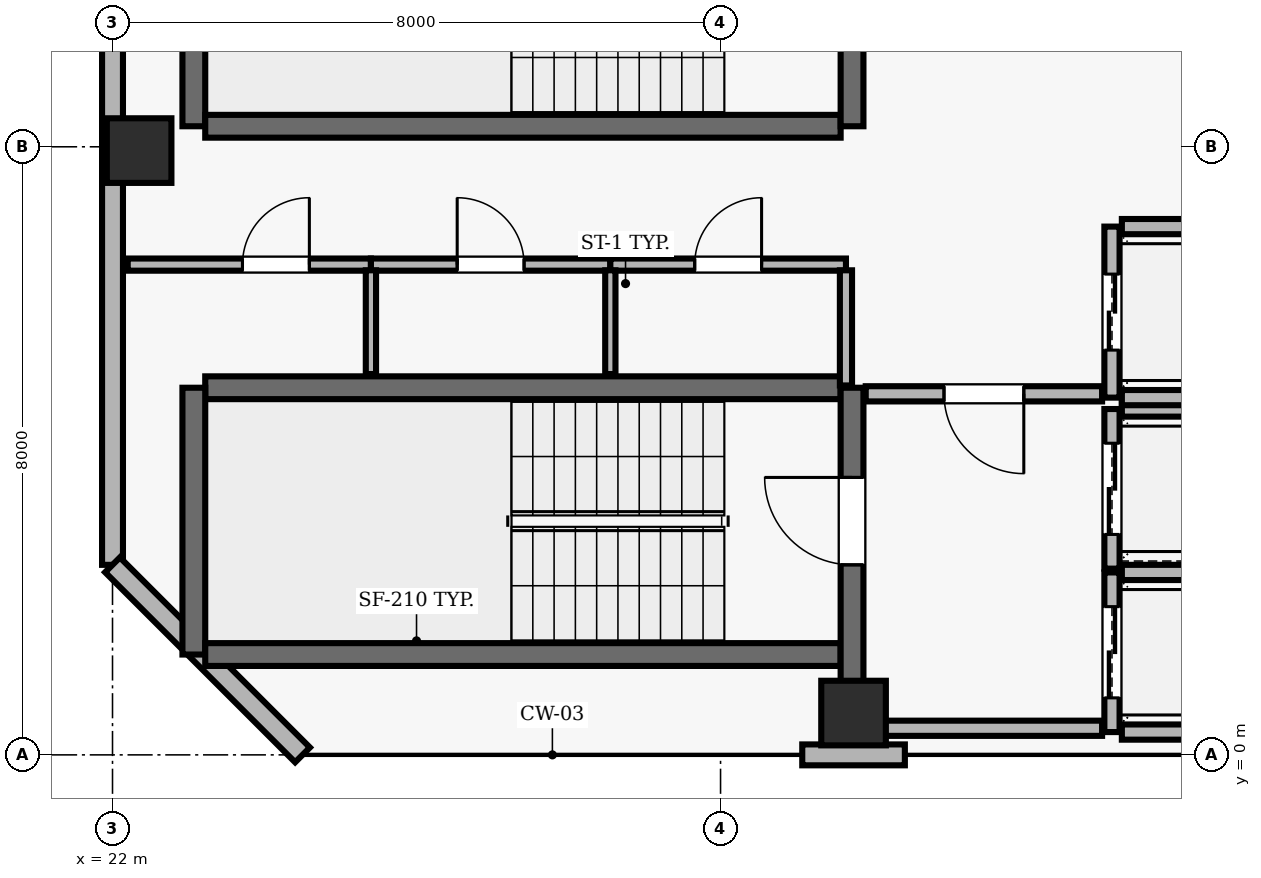
"""IFC4 building model, lengths in metres.
Left out: names, types, materials, properties, quantities, classifications, styles, units other than length and angle.
Written with IfcOpenShell. Run it as: python <this file> out.ifc"""

import sys

from ifc_helpers import new_model, si_unit, direction, frame, frame_2d, origin, origin_2d, place, context, subcontext, project, spatial, rectangle, extrude, element, fill, save


model = new_model("IFC4")
c1 = context("Model", 3, precision=1e-05, world=origin(), true_north=direction((0.0, 1.0)))
c2 = subcontext(c1, "Body", "Model", "MODEL_VIEW")
j1 = project(units=[si_unit("LENGTHUNIT", "METRE"), si_unit("PLANEANGLEUNIT", "RADIAN")], contexts=[c1])
p1 = place(None, origin())
s1 = spatial("IfcSite", under=j1, at=p1, CompositionType="ELEMENT")
p2 = place(p1, origin())
s2 = spatial("IfcBuilding", under=s1, at=p2, CompositionType="ELEMENT")
p3 = place(p2, frame((0.0, 0.0, 256.0)))
s3 = spatial("IfcBuildingStorey", under=s2, at=p3, CompositionType="ELEMENT", Elevation=256.0)
for number, where, z_axis, x_axis in (
    (1, (31.75, 0.55, 0.0), (0.0, 0.0, 1.0), (1.0, 0.0, 0.0)),
    (2, (22.35, 7.95, 0.0), (0.0, 0.0, 1.0), (1.0, 0.0, 0.0)),
):
    element("IfcColumn", number, at=place(p3, frame(where, z_axis=z_axis, x_axis=x_axis)), inside=s3, PredefinedType="COLUMN", context=c2, shape_type="SweptSolid", body=[
        extrude(rectangle(XDim=0.85, YDim=0.85, at=origin_2d()), origin(), (0.0, 0.0, 1.0), 3.9),
    ])
p4 = place(p3, frame((31.075, 0.0, 0.0), z_axis=(0.0, 0.0, 1.0), x_axis=(1.0, 0.0, 0.0)))
e3 = element("IfcWall", 3, at=p4, inside=s3, PredefinedType="SOLIDWALL", context=c2, shape_type="SweptSolid", body=[
    extrude(rectangle(XDim=1.35, YDim=0.275, at=frame_2d((0.675, 0.0))), origin(), (0.0, 0.0, 1.0), 3.69),
])
p5 = place(p3, frame((22.0, 35.3, 0.0), z_axis=(0.0, 0.0, 1.0), x_axis=(0.0, -1.0, 0.0)))
e4 = element("IfcWall", 4, at=p5, inside=s3, PredefinedType="SOLIDWALL", context=c2, shape_type="SweptSolid", body=[
    extrude(rectangle(XDim=32.8, YDim=0.275, at=frame_2d((16.4, 0.0))), origin(), (0.0, 0.0, 1.0), 3.69),
])
p6 = place(p5, frame((7.3, 0.0, 0.0)))
e5 = element("IfcOpeningElement", 5, at=p6, cuts=e4, PredefinedType="OPENING", context=c2, shape_type="SweptSolid", body=[
    extrude(rectangle(XDim=1.0, YDim=2.2, at=frame_2d((0.5, 1.1))), frame((0.0, 0.147, 0.0), z_axis=(0.0, -1.0, 0.0), x_axis=(1.0, 0.0, 0.0)), (0.0, 0.0, 1.0), 0.295),
])
p7 = place(p5, frame((1.833, 0.0, 0.9)))
e6 = element("IfcOpeningElement", 6, at=p7, cuts=e4, PredefinedType="OPENING", context=c2, shape_type="SweptSolid", body=[
    extrude(rectangle(XDim=1.8, YDim=1.6, at=frame_2d((0.9, 0.8))), frame((0.0, 0.147, 0.0), z_axis=(0.0, -1.0, 0.0), x_axis=(1.0, 0.0, 0.0)), (0.0, 0.0, 1.0), 0.295),
])
p8 = place(p5, frame((12.767, 0.0, 0.9)))
e7 = element("IfcOpeningElement", 7, at=p8, cuts=e4, PredefinedType="OPENING", context=c2, shape_type="SweptSolid", body=[
    extrude(rectangle(XDim=1.8, YDim=1.6, at=frame_2d((0.9, 0.8))), frame((0.0, 0.147, 0.0), z_axis=(0.0, -1.0, 0.0), x_axis=(1.0, 0.0, 0.0)), (0.0, 0.0, 1.0), 0.295),
])
p9 = place(p5, frame((18.233, 0.0, 0.9)))
e8 = element("IfcOpeningElement", 8, at=p9, cuts=e4, PredefinedType="OPENING", context=c2, shape_type="SweptSolid", body=[
    extrude(rectangle(XDim=1.8, YDim=1.6, at=frame_2d((0.9, 0.8))), frame((0.0, 0.147, 0.0), z_axis=(0.0, -1.0, 0.0), x_axis=(1.0, 0.0, 0.0)), (0.0, 0.0, 1.0), 0.295),
])
p10 = place(p5, frame((23.7, 0.0, 0.9)))
e9 = element("IfcOpeningElement", 9, at=p10, cuts=e4, PredefinedType="OPENING", context=c2, shape_type="SweptSolid", body=[
    extrude(rectangle(XDim=1.8, YDim=1.6, at=frame_2d((0.9, 0.8))), frame((0.0, 0.147, 0.0), z_axis=(0.0, -1.0, 0.0), x_axis=(1.0, 0.0, 0.0)), (0.0, 0.0, 1.0), 0.295),
])
p11 = place(p3, frame((22.0, 2.5, 0.0), z_axis=(0.0, 0.0, 1.0), x_axis=(0.707106781187, -0.707106781187, 0.0)))
e10 = element("IfcWall", 10, at=p11, inside=s3, PredefinedType="SOLIDWALL", context=c2, shape_type="SweptSolid", body=[
    extrude(rectangle(XDim=3.536, YDim=0.275, at=frame_2d((1.768, 0.0))), origin(), (0.0, 0.0, 1.0), 3.69),
])
p12 = place(p3, frame((31.58, 4.83, 0.0), z_axis=(0.0, 0.0, 1.0), x_axis=(-1.0, 0.0, 0.0)))
e11 = element("IfcWall", 11, at=p12, inside=s3, PredefinedType="SHEAR", context=c2, shape_type="SweptSolid", body=[
    extrude(rectangle(XDim=8.36, YDim=0.3, at=frame_2d((4.18, 0.0))), origin(), (0.0, 0.0, 1.0), 3.69),
])
p13 = place(p3, frame((23.07, 4.83, 0.0), z_axis=(0.0, 0.0, 1.0), x_axis=(0.0, -1.0, 0.0)))
e12 = element("IfcWall", 12, at=p13, inside=s3, PredefinedType="SHEAR", context=c2, shape_type="SweptSolid", body=[
    extrude(rectangle(XDim=3.51, YDim=0.3, at=frame_2d((1.755, 0.0))), origin(), (0.0, 0.0, 1.0), 3.69),
])
p14 = place(p3, frame((23.22, 1.32, 0.0), z_axis=(0.0, 0.0, 1.0), x_axis=(1.0, 0.0, 0.0)))
e13 = element("IfcWall", 13, at=p14, inside=s3, PredefinedType="SHEAR", context=c2, shape_type="SweptSolid", body=[
    extrude(rectangle(XDim=8.36, YDim=0.3, at=frame_2d((4.18, 0.0))), origin(), (0.0, 0.0, 1.0), 3.69),
])
p15 = place(p3, frame((31.73, 0.96, 0.0), z_axis=(0.0, 0.0, 1.0), x_axis=(0.0, 1.0, 0.0)))
e14 = element("IfcWall", 14, at=p15, inside=s3, PredefinedType="SHEAR", context=c2, shape_type="SweptSolid", body=[
    extrude(rectangle(XDim=3.87, YDim=0.3, at=frame_2d((1.935, 0.0))), origin(), (0.0, 0.0, 1.0), 3.69),
])
p16 = place(p15, frame((1.54, 0.0, 0.0)))
e15 = element("IfcOpeningElement", 15, at=p16, cuts=e14, PredefinedType="OPENING", context=c2, shape_type="SweptSolid", body=[
    extrude(rectangle(XDim=1.15, YDim=2.15, at=frame_2d((0.575, 1.075))), frame((0.0, 0.16, 0.0), z_axis=(0.0, -1.0, 0.0), x_axis=(1.0, 0.0, 0.0)), (0.0, 0.0, 1.0), 0.32),
])
p17 = place(p3, frame((23.07, 11.78, 0.0), z_axis=(0.0, 0.0, 1.0), x_axis=(0.0, -1.0, 0.0)))
e16 = element("IfcWall", 16, at=p17, inside=s3, PredefinedType="SHEAR", context=c2, shape_type="SweptSolid", body=[
    extrude(rectangle(XDim=3.51, YDim=0.3, at=frame_2d((1.755, 0.0))), origin(), (0.0, 0.0, 1.0), 3.69),
])
p18 = place(p3, frame((23.22, 8.27, 0.0), z_axis=(0.0, 0.0, 1.0), x_axis=(1.0, 0.0, 0.0)))
e17 = element("IfcWall", 17, at=p18, inside=s3, PredefinedType="SHEAR", context=c2, shape_type="SweptSolid", body=[
    extrude(rectangle(XDim=8.36, YDim=0.3, at=frame_2d((4.18, 0.0))), origin(), (0.0, 0.0, 1.0), 3.69),
])
p19 = place(p3, frame((31.73, 8.27, 0.0), z_axis=(0.0, 0.0, 1.0), x_axis=(0.0, 1.0, 0.0)))
e18 = element("IfcWall", 18, at=p19, inside=s3, PredefinedType="SHEAR", context=c2, shape_type="SweptSolid", body=[
    extrude(rectangle(XDim=3.51, YDim=0.3, at=frame_2d((1.755, 0.0))), origin(), (0.0, 0.0, 1.0), 3.69),
])
p20 = place(p19, frame((1.18, 0.0, 0.0)))
e19 = element("IfcOpeningElement", 19, at=p20, cuts=e18, PredefinedType="OPENING", context=c2, shape_type="SweptSolid", body=[
    extrude(rectangle(XDim=1.15, YDim=2.15, at=frame_2d((0.575, 1.075))), frame((0.0, 0.16, 0.0), z_axis=(0.0, -1.0, 0.0), x_axis=(1.0, 0.0, 0.0)), (0.0, 0.0, 1.0), 0.32),
])
p21 = place(p3, frame((35.15, 2.4, 0.0), z_axis=(0.0, 0.0, 1.0), x_axis=(0.0, -1.0, 0.0)))
e20 = element("IfcWall", 20, at=p21, inside=s3, PredefinedType="SOLIDWALL", context=c2, shape_type="SweptSolid", body=[
    extrude(rectangle(XDim=2.1, YDim=0.2, at=frame_2d((1.05, 0.0))), origin(), (0.0, 0.0, 1.0), 3.69),
])
p22 = place(p21, frame((0.45, 0.0, 0.0)))
e21 = element("IfcOpeningElement", 21, at=p22, cuts=e20, PredefinedType="OPENING", context=c2, shape_type="SweptSolid", body=[
    extrude(rectangle(XDim=1.2, YDim=2.15, at=frame_2d((0.6, 1.075))), frame((0.0, 0.11, 0.0), z_axis=(0.0, -1.0, 0.0), x_axis=(1.0, 0.0, 0.0)), (0.0, 0.0, 1.0), 0.22),
])
for number, where, z_axis, x_axis in (
    (22, (35.28, 0.3, 0.0), (0.0, 0.0, 1.0), (1.0, 0.0, 0.0)),
    (23, (37.42, 2.4, 0.0), (0.0, 0.0, 1.0), (-1.0, 0.0, 0.0)),
):
    element("IfcWall", number, at=place(p3, frame(where, z_axis=z_axis, x_axis=x_axis)), inside=s3, PredefinedType="SOLIDWALL", context=c2, shape_type="SweptSolid", body=[
        extrude(rectangle(XDim=2.14, YDim=0.2, at=frame_2d((1.07, 0.0))), origin(), (0.0, 0.0, 1.0), 3.69),
    ])
p23 = place(p3, frame((35.15, 4.55, 0.0), z_axis=(0.0, 0.0, 1.0), x_axis=(0.0, -1.0, 0.0)))
e24 = element("IfcWall", 24, at=p23, inside=s3, PredefinedType="SOLIDWALL", context=c2, shape_type="SweptSolid", body=[
    extrude(rectangle(XDim=2.1, YDim=0.2, at=frame_2d((1.05, 0.0))), origin(), (0.0, 0.0, 1.0), 3.69),
])
p24 = place(p23, frame((0.45, 0.0, 0.0)))
e25 = element("IfcOpeningElement", 25, at=p24, cuts=e24, PredefinedType="OPENING", context=c2, shape_type="SweptSolid", body=[
    extrude(rectangle(XDim=1.2, YDim=2.15, at=frame_2d((0.6, 1.075))), frame((0.0, 0.11, 0.0), z_axis=(0.0, -1.0, 0.0), x_axis=(1.0, 0.0, 0.0)), (0.0, 0.0, 1.0), 0.22),
])
p25 = place(p3, frame((37.42, 4.55, 0.0), z_axis=(0.0, 0.0, 1.0), x_axis=(-1.0, 0.0, 0.0)))
e26 = element("IfcWall", 26, at=p25, inside=s3, PredefinedType="SOLIDWALL", context=c2, shape_type="SweptSolid", body=[
    extrude(rectangle(XDim=2.14, YDim=0.2, at=frame_2d((1.07, 0.0))), origin(), (0.0, 0.0, 1.0), 3.69),
])
p26 = place(p3, frame((35.15, 6.95, 0.0), z_axis=(0.0, 0.0, 1.0), x_axis=(0.0, -1.0, 0.0)))
e27 = element("IfcWall", 27, at=p26, inside=s3, PredefinedType="SOLIDWALL", context=c2, shape_type="SweptSolid", body=[
    extrude(rectangle(XDim=2.25, YDim=0.2, at=frame_2d((1.125, 0.0))), origin(), (0.0, 0.0, 1.0), 3.69),
])
p27 = place(p26, frame((0.625, 0.0, 0.0)))
e28 = element("IfcOpeningElement", 28, at=p27, cuts=e27, PredefinedType="OPENING", context=c2, shape_type="SweptSolid", body=[
    extrude(rectangle(XDim=1.0, YDim=2.1, at=frame_2d((0.5, 1.05))), frame((0.0, 0.11, 0.0), z_axis=(0.0, -1.0, 0.0), x_axis=(1.0, 0.0, 0.0)), (0.0, 0.0, 1.0), 0.22),
])
for number, where, z_axis, x_axis in (
    (29, (35.28, 4.7, 0.0), (0.0, 0.0, 1.0), (1.0, 0.0, 0.0)),
    (30, (37.42, 6.95, 0.0), (0.0, 0.0, 1.0), (-1.0, 0.0, 0.0)),
):
    element("IfcWall", number, at=place(p3, frame(where, z_axis=z_axis, x_axis=x_axis)), inside=s3, PredefinedType="SOLIDWALL", context=c2, shape_type="SweptSolid", body=[
        extrude(rectangle(XDim=2.14, YDim=0.2, at=frame_2d((1.07, 0.0))), origin(), (0.0, 0.0, 1.0), 3.69),
    ])
p28 = place(p3, frame((22.2, 6.45, 0.0), z_axis=(0.0, 0.0, 1.0), x_axis=(1.0, 0.0, 0.0)))
e31 = element("IfcWall", 31, at=p28, inside=s3, PredefinedType="PARTITIONING", context=c2, shape_type="SweptSolid", body=[
    extrude(rectangle(XDim=3.2, YDim=0.16, at=frame_2d((1.6, 0.0))), origin(), (0.0, 0.0, 1.0), 3.69),
])
p29 = place(p28, frame((1.51, 0.0, 0.0)))
e32 = element("IfcOpeningElement", 32, at=p29, cuts=e31, PredefinedType="OPENING", context=c2, shape_type="SweptSolid", body=[
    extrude(rectangle(XDim=0.88, YDim=2.1, at=frame_2d((0.44, 1.05))), frame((0.0, 0.09, 0.0), z_axis=(0.0, -1.0, 0.0), x_axis=(1.0, 0.0, 0.0)), (0.0, 0.0, 1.0), 0.18),
])
p30 = place(p3, frame((25.4, 6.45, 0.0), z_axis=(0.0, 0.0, 1.0), x_axis=(1.0, 0.0, 0.0)))
e33 = element("IfcWall", 33, at=p30, inside=s3, PredefinedType="PARTITIONING", context=c2, shape_type="SweptSolid", body=[
    extrude(rectangle(XDim=3.15, YDim=0.16, at=frame_2d((1.575, 0.0))), origin(), (0.0, 0.0, 1.0), 3.69),
])
p31 = place(p30, frame((1.135, 0.0, 0.0)))
e34 = element("IfcOpeningElement", 34, at=p31, cuts=e33, PredefinedType="OPENING", context=c2, shape_type="SweptSolid", body=[
    extrude(rectangle(XDim=0.88, YDim=2.1, at=frame_2d((0.44, 1.05))), frame((0.0, 0.09, 0.0), z_axis=(0.0, -1.0, 0.0), x_axis=(1.0, 0.0, 0.0)), (0.0, 0.0, 1.0), 0.18),
])
p32 = place(p3, frame((28.55, 6.45, 0.0), z_axis=(0.0, 0.0, 1.0), x_axis=(1.0, 0.0, 0.0)))
e35 = element("IfcWall", 35, at=p32, inside=s3, PredefinedType="PARTITIONING", context=c2, shape_type="SweptSolid", body=[
    extrude(rectangle(XDim=3.1, YDim=0.16, at=frame_2d((1.55, 0.0))), origin(), (0.0, 0.0, 1.0), 3.69),
])
p33 = place(p32, frame((1.11, 0.0, 0.0)))
e36 = element("IfcOpeningElement", 36, at=p33, cuts=e35, PredefinedType="OPENING", context=c2, shape_type="SweptSolid", body=[
    extrude(rectangle(XDim=0.88, YDim=2.1, at=frame_2d((0.44, 1.05))), frame((0.0, 0.09, 0.0), z_axis=(0.0, -1.0, 0.0), x_axis=(1.0, 0.0, 0.0)), (0.0, 0.0, 1.0), 0.18),
])
p34 = place(p3, frame((31.65, 0.35, 0.0), z_axis=(0.0, 0.0, 1.0), x_axis=(1.0, 0.0, 0.0)))
e37 = element("IfcWall", 37, at=p34, inside=s3, PredefinedType="SOLIDWALL", context=c2, shape_type="SweptSolid", body=[
    extrude(rectangle(XDim=3.37, YDim=0.2, at=frame_2d((1.685, 0.0))), origin(), (0.0, 0.0, 1.0), 3.69),
])
p35 = place(p3, frame((35.02, 4.75, 0.0), z_axis=(0.0, 0.0, 1.0), x_axis=(-1.0, 0.0, 0.0)))
e38 = element("IfcWall", 38, at=p35, inside=s3, PredefinedType="SOLIDWALL", context=c2, shape_type="SweptSolid", body=[
    extrude(rectangle(XDim=3.11, YDim=0.2, at=frame_2d((1.555, 0.0))), origin(), (0.0, 0.0, 1.0), 3.69),
])
p36 = place(p35, frame((1.03, 0.0, 0.0)))
e39 = element("IfcOpeningElement", 39, at=p36, cuts=e38, PredefinedType="OPENING", context=c2, shape_type="SweptSolid", body=[
    extrude(rectangle(XDim=1.05, YDim=2.15, at=frame_2d((0.525, 1.075))), frame((0.0, 0.11, 0.0), z_axis=(0.0, -1.0, 0.0), x_axis=(1.0, 0.0, 0.0)), (0.0, 0.0, 1.0), 0.22),
])
for number, where, z_axis, x_axis in (
    (40, (25.4, 5.01, 0.0), (0.0, 0.0, 1.0), (0.0, 1.0, 0.0)),
    (41, (28.55, 5.01, 0.0), (0.0, 0.0, 1.0), (0.0, 1.0, 0.0)),
):
    element("IfcWall", number, at=place(p3, frame(where, z_axis=z_axis, x_axis=x_axis)), inside=s3, PredefinedType="PARTITIONING", context=c2, shape_type="SweptSolid", body=[
        extrude(rectangle(XDim=1.365, YDim=0.135, at=frame_2d((0.683, 0.0))), origin(), (0.0, 0.0, 1.0), 3.69),
    ])
p37 = place(p3, frame((31.65, 4.86, 0.0), z_axis=(0.0, 0.0, 1.0), x_axis=(0.0, 1.0, 0.0)))
e42 = element("IfcWall", 42, at=p37, inside=s3, PredefinedType="PARTITIONING", context=c2, shape_type="SweptSolid", body=[
    extrude(rectangle(XDim=1.515, YDim=0.16, at=frame_2d((0.757, 0.0))), origin(), (0.0, 0.0, 1.0), 3.69),
])
p38 = place(p16, origin())
e43 = element("IfcDoor", 43, at=p38, inside=s3, OperationType="SINGLE_SWING_RIGHT", PredefinedType="DOOR", context=c2, shape_type="SweptSolid", body=[
    extrude(rectangle(XDim=1.15, YDim=2.15, at=frame_2d((0.575, 1.075))), frame((0.0, 0.025, 0.0), z_axis=(0.0, -1.0, 0.0), x_axis=(1.0, 0.0, 0.0)), (0.0, 0.0, 1.0), 0.05),
])
fill(e15, e43)
p39 = place(p22, origin())
e44 = element("IfcDoor", 44, at=p39, inside=s3, OperationType="DOUBLE_DOOR_SLIDING", PredefinedType="DOOR", context=c2, shape_type="SweptSolid", body=[
    extrude(rectangle(XDim=1.2, YDim=2.15, at=frame_2d((0.6, 1.075))), frame((0.0, 0.025, 0.0), z_axis=(0.0, -1.0, 0.0), x_axis=(1.0, 0.0, 0.0)), (0.0, 0.0, 1.0), 0.05),
])
fill(e21, e44)
p40 = place(p24, origin())
e45 = element("IfcDoor", 45, at=p40, inside=s3, OperationType="DOUBLE_DOOR_SLIDING", PredefinedType="DOOR", context=c2, shape_type="SweptSolid", body=[
    extrude(rectangle(XDim=1.2, YDim=2.15, at=frame_2d((0.6, 1.075))), frame((0.0, 0.025, 0.0), z_axis=(0.0, -1.0, 0.0), x_axis=(1.0, 0.0, 0.0)), (0.0, 0.0, 1.0), 0.05),
])
fill(e25, e45)
p41 = place(p27, origin())
e46 = element("IfcDoor", 46, at=p41, inside=s3, OperationType="DOUBLE_DOOR_SLIDING", PredefinedType="DOOR", context=c2, shape_type="SweptSolid", body=[
    extrude(rectangle(XDim=1.0, YDim=2.1, at=frame_2d((0.5, 1.05))), frame((0.0, 0.025, 0.0), z_axis=(0.0, -1.0, 0.0), x_axis=(1.0, 0.0, 0.0)), (0.0, 0.0, 1.0), 0.05),
])
fill(e28, e46)
p42 = place(p36, origin())
e47 = element("IfcDoor", 47, at=p42, inside=s3, OperationType="SINGLE_SWING_LEFT", PredefinedType="DOOR", context=c2, shape_type="SweptSolid", body=[
    extrude(rectangle(XDim=1.05, YDim=2.15, at=frame_2d((0.525, 1.075))), frame((0.0, 0.025, 0.0), z_axis=(0.0, -1.0, 0.0), x_axis=(1.0, 0.0, 0.0)), (0.0, 0.0, 1.0), 0.05),
])
fill(e39, e47)
p43 = place(p29, origin())
e48 = element("IfcDoor", 48, at=p43, inside=s3, OperationType="SINGLE_SWING_RIGHT", PredefinedType="DOOR", context=c2, shape_type="SweptSolid", body=[
    extrude(rectangle(XDim=0.88, YDim=2.1, at=frame_2d((0.44, 1.05))), frame((0.0, 0.025, 0.0), z_axis=(0.0, -1.0, 0.0), x_axis=(1.0, 0.0, 0.0)), (0.0, 0.0, 1.0), 0.05),
])
fill(e32, e48)
p44 = place(p31, origin())
e49 = element("IfcDoor", 49, at=p44, inside=s3, OperationType="SINGLE_SWING_LEFT", PredefinedType="DOOR", context=c2, shape_type="SweptSolid", body=[
    extrude(rectangle(XDim=0.88, YDim=2.1, at=frame_2d((0.44, 1.05))), frame((0.0, 0.025, 0.0), z_axis=(0.0, -1.0, 0.0), x_axis=(1.0, 0.0, 0.0)), (0.0, 0.0, 1.0), 0.05),
])
fill(e34, e49)
p45 = place(p33, origin())
e50 = element("IfcDoor", 50, at=p45, inside=s3, OperationType="SINGLE_SWING_RIGHT", PredefinedType="DOOR", context=c2, shape_type="SweptSolid", body=[
    extrude(rectangle(XDim=0.88, YDim=2.1, at=frame_2d((0.44, 1.05))), frame((0.0, 0.025, 0.0), z_axis=(0.0, -1.0, 0.0), x_axis=(1.0, 0.0, 0.0)), (0.0, 0.0, 1.0), 0.05),
])
fill(e36, e50)
save(model, sys.argv[1])
